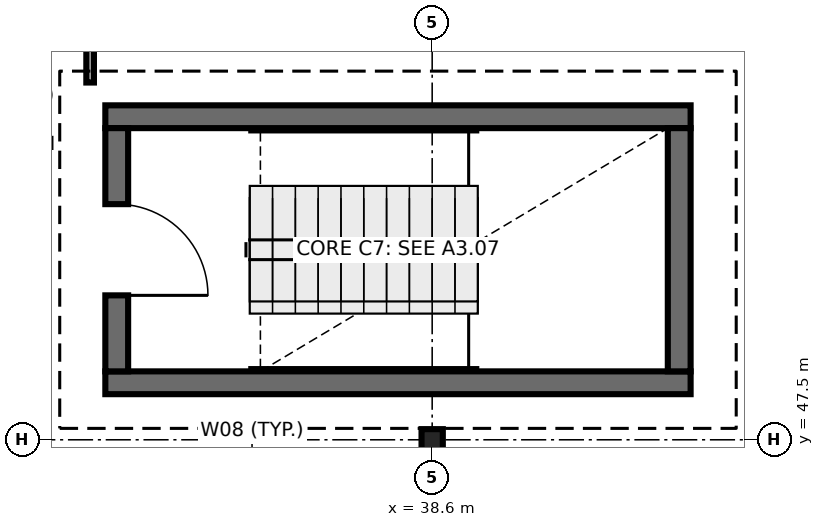
"""IFC4 building model, lengths in metres.
Left out: names, types, materials, properties, quantities, classifications, styles, units other than length and angle.
Written with IfcOpenShell. Run it as: python <this file> out.ifc"""

import sys

from ifc_helpers import new_model, si_unit, direction, frame, frame_2d, origin, origin_2d, place, context, subcontext, project, spatial, rectangle, i_section, extrude, element, fill, save


model = new_model("IFC4")
c1 = context("Model", 3, precision=1e-05, world=origin(), true_north=direction((0.0, 1.0)))
c2 = subcontext(c1, "Body", "Model", "MODEL_VIEW")
j1 = project(units=[si_unit("LENGTHUNIT", "METRE"), si_unit("PLANEANGLEUNIT", "RADIAN")], contexts=[c1])
p1 = place(None, origin())
s1 = spatial("IfcSite", under=j1, at=p1, CompositionType="ELEMENT")
p2 = place(p1, origin())
s2 = spatial("IfcBuilding", under=s1, at=p2, CompositionType="ELEMENT")
p3 = place(p2, frame((0.0, 0.0, 26.7)))
s3 = spatial("IfcBuildingStorey", under=s2, at=p3, CompositionType="ELEMENT", Elevation=26.7)
p4 = place(p3, frame((38.6, 47.5, 0.0), z_axis=(0.0, 0.0, 1.0), x_axis=(1.0, 0.0, 0.0)))
e1 = element("IfcColumn", 1, at=p4, inside=s3, PredefinedType="COLUMN", context=c2, shape_type="SweptSolid", body=[
    extrude(i_section(OverallWidth=0.28, OverallDepth=0.28, WebThickness=0.01, FlangeThickness=0.018, FilletRadius=0.024, at=origin_2d()), origin(), (0.0, 0.0, 1.0), 3.9),
])
for number, where, z_axis, x_axis in (
    (2, (34.3, 48.25, 0.0), (0.0, 0.0, 1.0), (1.0, 0.0, 0.0)),
    (3, (42.0, 51.75, 0.0), (0.0, 0.0, 1.0), (-1.0, 0.0, 0.0)),
):
    element("IfcWall", number, at=place(p3, frame(where, z_axis=z_axis, x_axis=x_axis)), inside=s3, PredefinedType="SHEAR", context=c2, shape_type="SweptSolid", body=[
        extrude(rectangle(XDim=7.7, YDim=0.3, at=frame_2d((3.85, 0.0))), origin(), (0.0, 0.0, 1.0), 3.9),
    ])
p5 = place(p3, frame((34.45, 51.6, 0.0), z_axis=(0.0, 0.0, 1.0), x_axis=(0.0, -1.0, 0.0)))
e4 = element("IfcWall", 4, at=p5, inside=s3, PredefinedType="SHEAR", context=c2, shape_type="SweptSolid", body=[
    extrude(rectangle(XDim=3.2, YDim=0.3, at=frame_2d((1.6, 0.0))), origin(), (0.0, 0.0, 1.0), 3.9),
])
p6 = place(p5, frame((1.0, 0.0, 0.0)))
e5 = element("IfcOpeningElement", 5, at=p6, cuts=e4, PredefinedType="OPENING", context=c2, shape_type="SweptSolid", body=[
    extrude(rectangle(XDim=1.2, YDim=2.15, at=frame_2d((0.6, 1.075))), frame((0.0, 0.16, 0.0), z_axis=(0.0, -1.0, 0.0), x_axis=(1.0, 0.0, 0.0)), (0.0, 0.0, 1.0), 0.32),
])
p7 = place(p3, frame((41.85, 48.4, 0.0), z_axis=(0.0, 0.0, 1.0), x_axis=(0.0, 1.0, 0.0)))
e6 = element("IfcWall", 6, at=p7, inside=s3, PredefinedType="SHEAR", context=c2, shape_type="SweptSolid", body=[
    extrude(rectangle(XDim=3.2, YDim=0.3, at=frame_2d((1.6, 0.0))), origin(), (0.0, 0.0, 1.0), 3.9),
])
p8 = place(p3, frame((34.1, 52.2, 0.0), z_axis=(0.0, 0.0, 1.0), x_axis=(0.0, 1.0, 0.0)))
e7 = element("IfcWall", 7, at=p8, inside=s3, PredefinedType="PARTITIONING", context=c2, shape_type="SweptSolid", body=[
    extrude(rectangle(XDim=5.4, YDim=0.1, at=frame_2d((2.7, 0.0))), origin(), (0.0, 0.0, 1.0), 3.68),
])
p9 = place(p8, frame((2.225, 0.0, 0.0)))
e8 = element("IfcOpeningElement", 8, at=p9, cuts=e7, PredefinedType="OPENING", context=c2, shape_type="SweptSolid", body=[
    extrude(rectangle(XDim=0.95, YDim=2.1, at=frame_2d((0.475, 1.05))), frame((0.0, 0.06, 0.0), z_axis=(0.0, -1.0, 0.0), x_axis=(1.0, 0.0, 0.0)), (0.0, 0.0, 1.0), 0.12),
])
p10 = place(p6, origin())
e9 = element("IfcDoor", 9, at=p10, inside=s3, OperationType="SINGLE_SWING_RIGHT", PredefinedType="DOOR", context=c2, shape_type="SweptSolid", body=[
    extrude(rectangle(XDim=1.2, YDim=2.15, at=frame_2d((0.6, 1.075))), frame((0.0, 0.025, 0.0), z_axis=(0.0, -1.0, 0.0), x_axis=(1.0, 0.0, 0.0)), (0.0, 0.0, 1.0), 0.05),
])
fill(e5, e9)
save(model, sys.argv[1])
